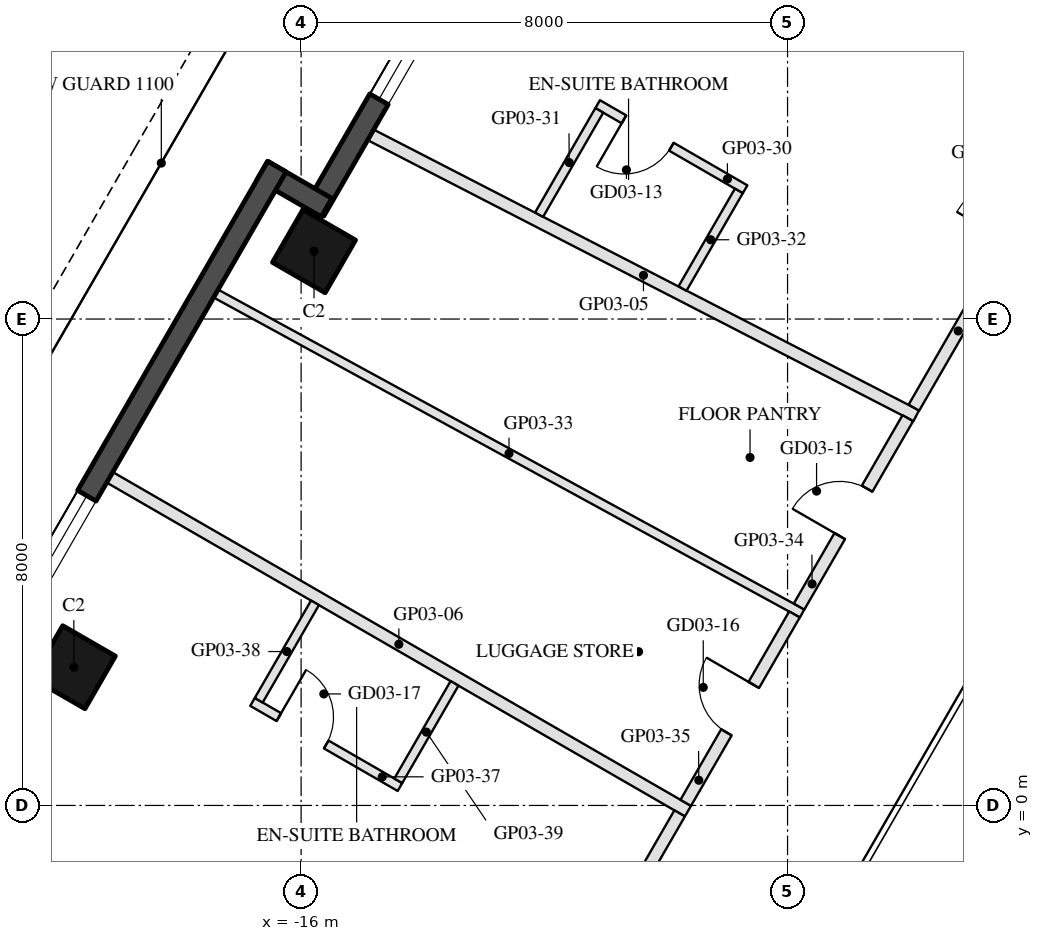
"""IFC4 building model, lengths in metres.
Left out: names, types, materials, properties, quantities, classifications, styles, units other than length and angle.
Written with IfcOpenShell. Run it as: python <this file> out.ifc"""

import sys

from ifc_helpers import new_model, si_unit, direction, frame, frame_2d, origin, origin_2d, place, context, subcontext, project, spatial, rectangle, hollow_rectangle, extrude, element, fill, save


model = new_model("IFC4")
c1 = context("Model", 3, precision=1e-05, world=origin(), true_north=direction((0.0, 1.0)))
c2 = subcontext(c1, "Body", "Model", "MODEL_VIEW")
j1 = project(units=[si_unit("LENGTHUNIT", "METRE"), si_unit("PLANEANGLEUNIT", "RADIAN")], contexts=[c1])
p1 = place(None, origin())
s1 = spatial("IfcSite", under=j1, at=p1, CompositionType="ELEMENT")
p2 = place(p1, origin())
s2 = spatial("IfcBuilding", under=s1, at=p2, CompositionType="ELEMENT")
p3 = place(p2, frame((0.0, 0.0, 68.7)))
s3 = spatial("IfcBuildingStorey", under=s2, at=p3, CompositionType="ELEMENT", Elevation=68.7)
for number, where, z_axis, x_axis in (
    (1, (-15.788, 9.115, 0.0), (0.0, 0.0, 1.0), (0.5, 0.866, 0.0)),
    (2, (-19.738, 2.273, 0.0), (0.0, 0.0, 1.0), (0.5, 0.866, 0.0)),
):
    element("IfcColumn", number, at=place(p3, frame(where, z_axis=z_axis, x_axis=x_axis)), inside=s3, PredefinedType="COLUMN", context=c2, shape_type="SweptSolid", body=[
        extrude(hollow_rectangle(XDim=1.0, YDim=1.0, WallThickness=0.045, at=origin_2d()), origin(), (0.0, 0.0, 1.0), 3.7),
    ])
p4 = place(p3, frame((-12.409, 15.617, 0.0), z_axis=(0.0, 0.0, 1.0), x_axis=(-0.500003597184, -0.866023326939, 0.0)))
e3 = element("IfcWall", 3, at=p4, inside=s3, PredefinedType="SOLIDWALL", context=c2, shape_type="SweptSolid", body=[
    extrude(rectangle(XDim=6.74, YDim=0.35, at=frame_2d((3.37, 0.0))), origin(), (0.0, 0.0, 1.0), 3.55),
])
p5 = place(p4, frame((0.32, 0.0, 0.3)))
e4 = element("IfcOpeningElement", 4, at=p5, cuts=e3, PredefinedType="OPENING", context=c2, shape_type="SweptSolid", body=[
    extrude(rectangle(XDim=2.0, YDim=2.65, at=frame_2d((1.0, 1.325))), frame((0.0, 0.185, 0.0), z_axis=(0.0, -1.0, 0.0), x_axis=(1.0, 0.0, 0.0)), (0.0, 0.0, 1.0), 0.37),
])
p6 = place(p4, frame((2.62, 0.0, 0.3)))
e5 = element("IfcOpeningElement", 5, at=p6, cuts=e3, PredefinedType="OPENING", context=c2, shape_type="SweptSolid", body=[
    extrude(rectangle(XDim=2.0, YDim=2.65, at=frame_2d((1.0, 1.325))), frame((0.0, 0.185, 0.0), z_axis=(0.0, -1.0, 0.0), x_axis=(1.0, 0.0, 0.0)), (0.0, 0.0, 1.0), 0.37),
])
p7 = place(p3, frame((-15.581, 9.833, 0.0), z_axis=(0.0, 0.0, 1.0), x_axis=(-0.866055662726, 0.499947586314, 0.0)))
e6 = element("IfcWall", 6, at=p7, inside=s3, PredefinedType="SOLIDWALL", context=c2, shape_type="SweptSolid", body=[
    extrude(rectangle(XDim=1.22, YDim=0.35, at=frame_2d((0.61, 0.0))), origin(), (0.0, 0.0, 1.0), 3.55),
])
p8 = place(p3, frame((-16.398, 10.507, 0.0), z_axis=(0.0, 0.0, 1.0), x_axis=(-0.499999142773, -0.866025898704, 0.0)))
e7 = element("IfcWall", 7, at=p8, inside=s3, PredefinedType="SOLIDWALL", context=c2, shape_type="SweptSolid", body=[
    extrude(rectangle(XDim=9.7, YDim=0.35, at=frame_2d((4.85, 0.0))), origin(), (0.0, 0.0, 1.0), 3.55),
])
p9 = place(p8, frame((6.25, 0.0, 0.3)))
e8 = element("IfcOpeningElement", 8, at=p9, cuts=e7, PredefinedType="OPENING", context=c2, shape_type="SweptSolid", body=[
    extrude(rectangle(XDim=1.6, YDim=2.65, at=frame_2d((0.8, 1.325))), frame((0.0, 0.185, 0.0), z_axis=(0.0, -1.0, 0.0), x_axis=(1.0, 0.0, 0.0)), (0.0, 0.0, 1.0), 0.37),
])
p10 = place(p3, frame((-14.856, 11.029, 0.0), z_axis=(0.0, 0.0, 1.0), x_axis=(0.889105841633, -0.457701652142, 0.0)))
e9 = element("IfcWall", 9, at=p10, inside=s3, PredefinedType="PARTITIONING", context=c2, shape_type="SweptSolid", body=[
    extrude(rectangle(XDim=10.092, YDim=0.2, at=frame_2d((5.046, 0.0))), origin(), (0.0, 0.0, 1.0), 2.96),
])
p11 = place(p3, frame((-19.147, 5.396, 0.0), z_axis=(0.0, 0.0, 1.0), x_axis=(0.866027479907, -0.499996404033, 0.0)))
e10 = element("IfcWall", 10, at=p11, inside=s3, PredefinedType="PARTITIONING", context=c2, shape_type="SweptSolid", body=[
    extrude(rectangle(XDim=10.98, YDim=0.2, at=frame_2d((5.49, 0.0))), origin(), (0.0, 0.0, 1.0), 2.96),
])
p12 = place(p3, frame((-5.922, 6.542, 0.0), z_axis=(0.0, 0.0, 1.0), x_axis=(0.499989401968, 0.866031522475, 0.0)))
e11 = element("IfcWall", 11, at=p12, inside=s3, PredefinedType="PARTITIONING", context=c2, shape_type="SweptSolid", body=[
    extrude(rectangle(XDim=7.283, YDim=0.2, at=frame_2d((3.642, 0.0))), origin(), (0.0, 0.0, 1.0), 2.95),
])
p13 = place(p12, frame((3.142, 0.0, 0.0)))
e12 = element("IfcOpeningElement", 12, at=p13, cuts=e11, PredefinedType="OPENING", context=c2, shape_type="SweptSolid", body=[
    extrude(rectangle(XDim=1.0, YDim=2.1, at=frame_2d((0.5, 1.05))), frame((0.0, 0.11, 0.0), z_axis=(0.0, -1.0, 0.0), x_axis=(1.0, 0.0, 0.0)), (0.0, 0.0, 1.0), 0.22),
])
p14 = place(p3, frame((-8.698, 10.134, 0.0), z_axis=(0.0, 0.0, 1.0), x_axis=(-0.866034573852, 0.49998411664, 0.0)))
e13 = element("IfcWall", 13, at=p14, inside=s3, PredefinedType="PARTITIONING", context=c2, shape_type="SweptSolid", body=[
    extrude(rectangle(XDim=2.8, YDim=0.15, at=frame_2d((1.4, 0.0))), origin(), (0.0, 0.0, 1.0), 3.55),
])
p15 = place(p14, frame((1.4, 0.0, 0.0)))
e14 = element("IfcOpeningElement", 14, at=p15, cuts=e13, PredefinedType="OPENING", context=c2, shape_type="SweptSolid", body=[
    extrude(rectangle(XDim=0.9, YDim=2.1, at=frame_2d((0.45, 1.05))), frame((0.0, 0.085, 0.0), z_axis=(0.0, -1.0, 0.0), x_axis=(1.0, 0.0, 0.0)), (0.0, 0.0, 1.0), 0.17),
])
p16 = place(p3, frame((-11.096, 11.432, 0.0), z_axis=(0.0, 0.0, 1.0), x_axis=(-0.500035331196, -0.866005004348, 0.0)))
e15 = element("IfcWall", 15, at=p16, inside=s3, PredefinedType="PARTITIONING", context=c2, shape_type="SweptSolid", body=[
    extrude(rectangle(XDim=1.981, YDim=0.15, at=frame_2d((0.991, 0.0))), origin(), (0.0, 0.0, 1.0), 2.95),
])
p17 = place(p3, frame((-8.801, 10.107, 0.0), z_axis=(0.0, 0.0, 1.0), x_axis=(-0.499992292652, -0.866029853578, 0.0)))
e16 = element("IfcWall", 16, at=p17, inside=s3, PredefinedType="PARTITIONING", context=c2, shape_type="SweptSolid", body=[
    extrude(rectangle(XDim=1.854, YDim=0.15, at=frame_2d((0.927, 0.0))), origin(), (0.0, 0.0, 1.0), 2.95),
])
p18 = place(p3, frame((-17.402, 8.419, 0.0), z_axis=(0.0, 0.0, 1.0), x_axis=(0.877831004422, -0.47897048727, 0.0)))
e17 = element("IfcWall", 17, at=p18, inside=s3, PredefinedType="PARTITIONING", context=c2, shape_type="SweptSolid", body=[
    extrude(rectangle(XDim=10.983, YDim=0.15, at=frame_2d((5.492, 0.0))), origin(), (0.0, 0.0, 1.0), 2.96),
])
p19 = place(p3, frame((-7.811, 3.271, 0.0), z_axis=(0.0, 0.0, 1.0), x_axis=(0.4999705729, 0.866042392862, 0.0)))
e18 = element("IfcWall", 18, at=p19, inside=s3, PredefinedType="PARTITIONING", context=c2, shape_type="SweptSolid", body=[
    extrude(rectangle(XDim=3.577, YDim=0.2, at=frame_2d((1.789, 0.0))), origin(), (0.0, 0.0, 1.0), 2.95),
])
p20 = place(p19, frame((1.339, 0.0, 0.0)))
e19 = element("IfcOpeningElement", 19, at=p20, cuts=e18, PredefinedType="OPENING", context=c2, shape_type="SweptSolid", body=[
    extrude(rectangle(XDim=0.9, YDim=2.1, at=frame_2d((0.45, 1.05))), frame((0.0, 0.11, 0.0), z_axis=(0.0, -1.0, 0.0), x_axis=(1.0, 0.0, 0.0)), (0.0, 0.0, 1.0), 0.22),
])
p21 = place(p3, frame((-9.675, 0.043, 0.0), z_axis=(0.0, 0.0, 1.0), x_axis=(0.500000124603, 0.866025331845, 0.0)))
e20 = element("IfcWall", 20, at=p21, inside=s3, PredefinedType="PARTITIONING", context=c2, shape_type="SweptSolid", body=[
    extrude(rectangle(XDim=3.577, YDim=0.2, at=frame_2d((1.789, 0.0))), origin(), (0.0, 0.0, 1.0), 2.95),
])
p22 = place(p21, frame((1.339, 0.0, 0.0)))
e21 = element("IfcOpeningElement", 21, at=p22, cuts=e20, PredefinedType="OPENING", context=c2, shape_type="SweptSolid", body=[
    extrude(rectangle(XDim=0.9, YDim=2.1, at=frame_2d((0.45, 1.05))), frame((0.0, 0.11, 0.0), z_axis=(0.0, -1.0, 0.0), x_axis=(1.0, 0.0, 0.0)), (0.0, 0.0, 1.0), 0.22),
])
p23 = place(p3, frame((-12.269, -4.45, 0.0), z_axis=(0.0, 0.0, 1.0), x_axis=(0.500013374061, 0.866017682129, 0.0)))
e22 = element("IfcWall", 22, at=p23, inside=s3, PredefinedType="PARTITIONING", context=c2, shape_type="SweptSolid", body=[
    extrude(rectangle(XDim=4.988, YDim=0.2, at=frame_2d((2.494, 0.0))), origin(), (0.0, 0.0, 1.0), 2.95),
])
p24 = place(p23, frame((1.994, 0.0, 0.0)))
e23 = element("IfcOpeningElement", 23, at=p24, cuts=e22, PredefinedType="OPENING", context=c2, shape_type="SweptSolid", body=[
    extrude(rectangle(XDim=1.0, YDim=2.1, at=frame_2d((0.5, 1.05))), frame((0.0, 0.11, 0.0), z_axis=(0.0, -1.0, 0.0), x_axis=(1.0, 0.0, 0.0)), (0.0, 0.0, 1.0), 0.22),
])
p25 = place(p3, frame((-16.799, 1.703, 0.0), z_axis=(0.0, 0.0, 1.0), x_axis=(0.865996816683, -0.500049511043, 0.0)))
e24 = element("IfcWall", 24, at=p25, inside=s3, PredefinedType="PARTITIONING", context=c2, shape_type="SweptSolid", body=[
    extrude(rectangle(XDim=2.8, YDim=0.15, at=frame_2d((1.4, 0.0))), origin(), (0.0, 0.0, 1.0), 3.55),
])
p26 = place(p25, frame((0.5, 0.0, 0.0)))
e25 = element("IfcOpeningElement", 25, at=p26, cuts=e24, PredefinedType="OPENING", context=c2, shape_type="SweptSolid", body=[
    extrude(rectangle(XDim=0.9, YDim=2.1, at=frame_2d((0.45, 1.05))), frame((0.0, 0.085, 0.0), z_axis=(0.0, -1.0, 0.0), x_axis=(1.0, 0.0, 0.0)), (0.0, 0.0, 1.0), 0.17),
])
p27 = place(p3, frame((-15.772, 3.333, 0.0), z_axis=(0.0, 0.0, 1.0), x_axis=(-0.499985172903, -0.866033964044, 0.0)))
e26 = element("IfcWall", 26, at=p27, inside=s3, PredefinedType="PARTITIONING", context=c2, shape_type="SweptSolid", body=[
    extrude(rectangle(XDim=1.85, YDim=0.15, at=frame_2d((0.925, 0.0))), origin(), (0.0, 0.0, 1.0), 3.55),
])
p28 = place(p3, frame((-13.477, 2.007, 0.0), z_axis=(0.0, 0.0, 1.0), x_axis=(-0.500042316284, -0.866000971088, 0.0)))
e27 = element("IfcWall", 27, at=p28, inside=s3, PredefinedType="PARTITIONING", context=c2, shape_type="SweptSolid", body=[
    extrude(rectangle(XDim=1.85, YDim=0.15, at=frame_2d((0.925, 0.0))), origin(), (0.0, 0.0, 1.0), 3.55),
])
p29 = place(p6, origin())
e28 = element("IfcWindow", 28, at=p29, inside=s3, PartitioningType="SINGLE_PANEL", PredefinedType="WINDOW", context=c2, shape_type="SweptSolid", body=[
    extrude(rectangle(XDim=2.0, YDim=2.65, at=frame_2d((1.0, 1.325))), frame((0.0, 0.03, 0.0), z_axis=(0.0, -1.0, 0.0), x_axis=(1.0, 0.0, 0.0)), (0.0, 0.0, 1.0), 0.06),
])
fill(e5, e28)
p30 = place(p9, origin())
e29 = element("IfcWindow", 29, at=p30, inside=s3, PartitioningType="SINGLE_PANEL", PredefinedType="WINDOW", context=c2, shape_type="SweptSolid", body=[
    extrude(rectangle(XDim=1.6, YDim=2.65, at=frame_2d((0.8, 1.325))), frame((0.0, 0.03, 0.0), z_axis=(0.0, -1.0, 0.0), x_axis=(1.0, 0.0, 0.0)), (0.0, 0.0, 1.0), 0.06),
])
fill(e8, e29)
p31 = place(p15, origin())
e30 = element("IfcDoor", 30, at=p31, inside=s3, OperationType="SINGLE_SWING_RIGHT", PredefinedType="DOOR", context=c2, shape_type="SweptSolid", body=[
    extrude(rectangle(XDim=0.9, YDim=2.1, at=frame_2d((0.45, 1.05))), frame((0.0, 0.025, 0.0), z_axis=(0.0, -1.0, 0.0), x_axis=(1.0, 0.0, 0.0)), (0.0, 0.0, 1.0), 0.05),
])
fill(e14, e30)
p32 = place(p20, origin())
e31 = element("IfcDoor", 31, at=p32, inside=s3, OperationType="SINGLE_SWING_LEFT", PredefinedType="DOOR", context=c2, shape_type="SweptSolid", body=[
    extrude(rectangle(XDim=0.9, YDim=2.1, at=frame_2d((0.45, 1.05))), frame((0.0, 0.025, 0.0), z_axis=(0.0, -1.0, 0.0), x_axis=(1.0, 0.0, 0.0)), (0.0, 0.0, 1.0), 0.05),
])
fill(e19, e31)
p33 = place(p22, origin())
e32 = element("IfcDoor", 32, at=p33, inside=s3, OperationType="SINGLE_SWING_RIGHT", PredefinedType="DOOR", context=c2, shape_type="SweptSolid", body=[
    extrude(rectangle(XDim=0.9, YDim=2.1, at=frame_2d((0.45, 1.05))), frame((0.0, 0.025, 0.0), z_axis=(0.0, -1.0, 0.0), x_axis=(1.0, 0.0, 0.0)), (0.0, 0.0, 1.0), 0.05),
])
fill(e21, e32)
p34 = place(p26, origin())
e33 = element("IfcDoor", 33, at=p34, inside=s3, OperationType="SINGLE_SWING_LEFT", PredefinedType="DOOR", context=c2, shape_type="SweptSolid", body=[
    extrude(rectangle(XDim=0.9, YDim=2.1, at=frame_2d((0.45, 1.05))), frame((0.0, 0.025, 0.0), z_axis=(0.0, -1.0, 0.0), x_axis=(1.0, 0.0, 0.0)), (0.0, 0.0, 1.0), 0.05),
])
fill(e25, e33)
save(model, sys.argv[1])
